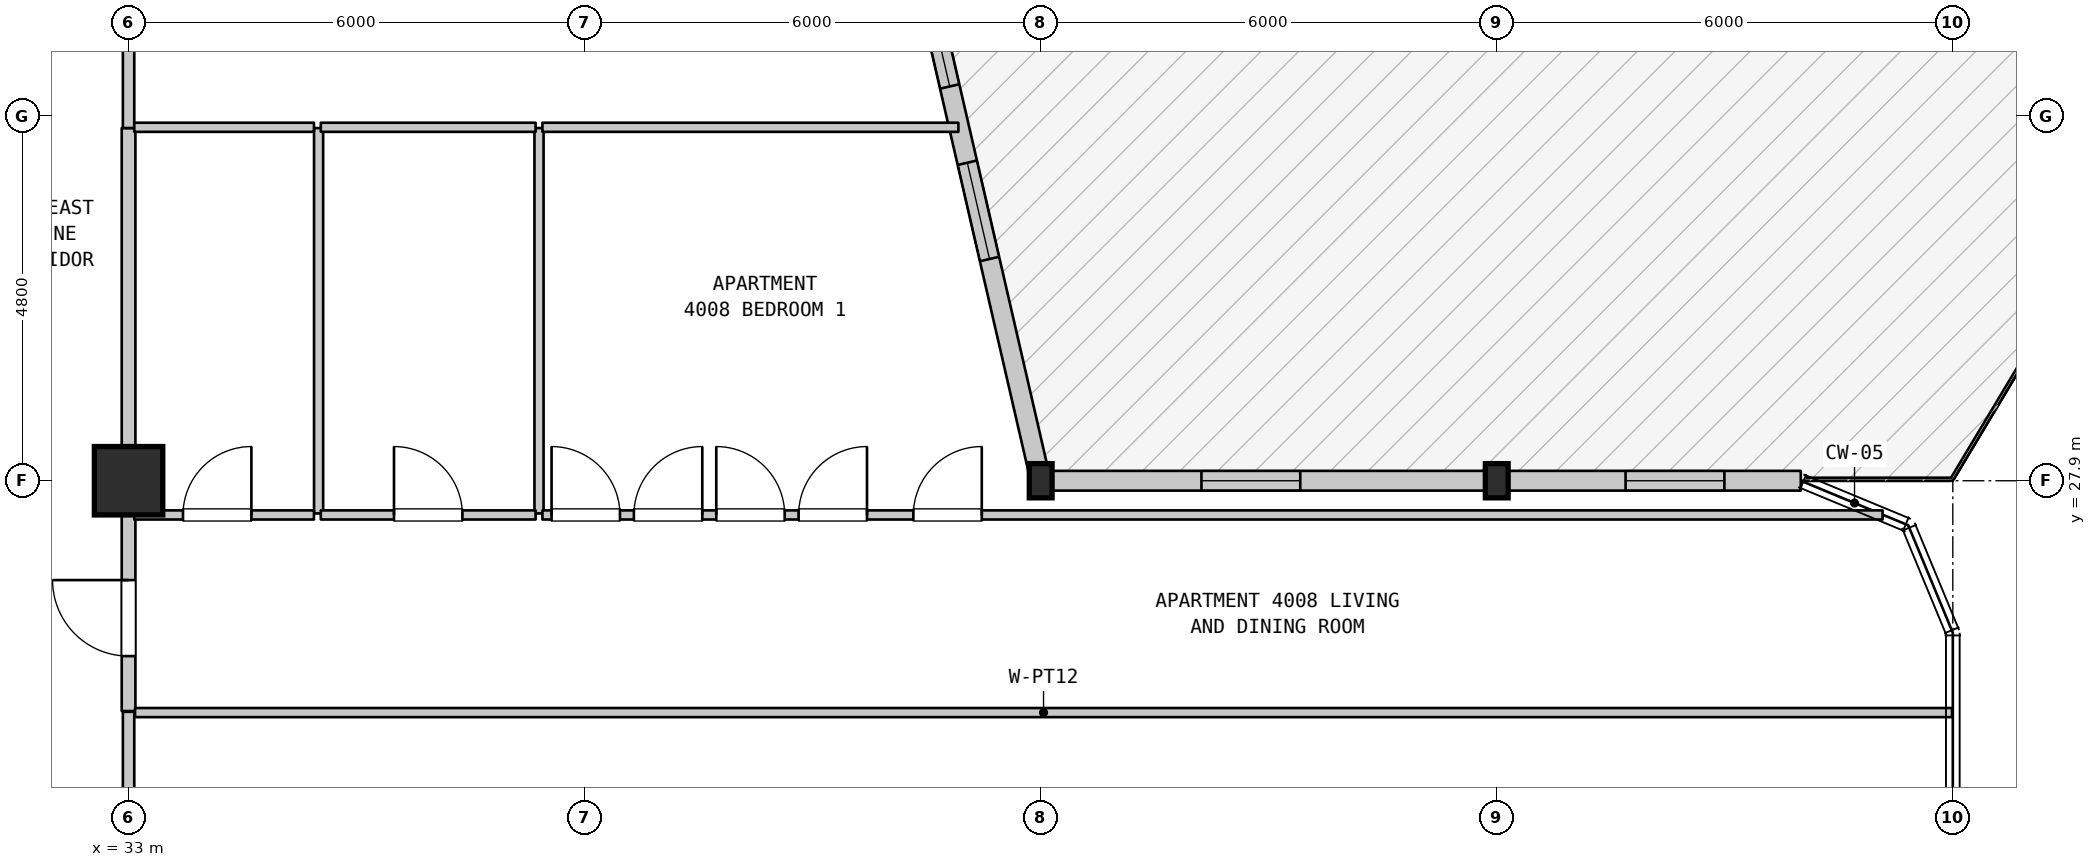
"""IFC4 building model, lengths in metres.
Left out: names, types, materials, properties, quantities, classifications, styles, units other than length and angle.
Written with IfcOpenShell. Run it as: python <this file> out.ifc"""

import sys

from ifc_helpers import new_model, si_unit, direction, frame, frame_2d, origin, origin_2d, place, context, subcontext, project, spatial, rectangle, i_section, extrude, element, fill, save


model = new_model("IFC4")
c1 = context("Model", 3, precision=1e-05, world=origin(), true_north=direction((0.0, 1.0)))
c2 = subcontext(c1, "Body", "Model", "MODEL_VIEW")
j1 = project(units=[si_unit("LENGTHUNIT", "METRE"), si_unit("PLANEANGLEUNIT", "RADIAN")], contexts=[c1])
p1 = place(None, origin())
s1 = spatial("IfcSite", under=j1, at=p1, CompositionType="ELEMENT")
p2 = place(p1, origin())
s2 = spatial("IfcBuilding", under=s1, at=p2, CompositionType="ELEMENT")
p3 = place(p2, frame((0.0, 0.0, 164.6)))
s3 = spatial("IfcBuildingStorey", under=s2, at=p3, CompositionType="ELEMENT", Elevation=164.6)
p4 = place(p3, frame((33.0, 27.9, 0.0), z_axis=(0.0, 0.0, 1.0), x_axis=(1.0, 0.0, 0.0)))
e1 = element("IfcColumn", 1, at=p4, inside=s3, PredefinedType="COLUMN", context=c2, shape_type="SweptSolid", body=[
    extrude(rectangle(XDim=0.9, YDim=0.9, at=origin_2d()), origin(), (0.0, 0.0, 1.0), 4.5),
])
for number, where, z_axis, x_axis in (
    (2, (45.0, 27.9, 0.0), (0.0, 0.0, 1.0), (1.0, 0.0, 0.0)),
    (3, (51.0, 27.9, 0.0), (0.0, 0.0, 1.0), (1.0, 0.0, 0.0)),
):
    element("IfcColumn", number, at=place(p3, frame(where, z_axis=z_axis, x_axis=x_axis)), inside=s3, PredefinedType="COLUMN", context=c2, shape_type="SweptSolid", body=[
        extrude(i_section(OverallWidth=0.3, OverallDepth=0.45, WebThickness=0.014, FlangeThickness=0.026, FilletRadius=0.027, at=origin_2d()), origin(), (0.0, 0.0, 1.0), 4.5),
    ])
p5 = place(p3, frame((39.358, 52.35, 0.0), z_axis=(0.0, 0.0, 1.0), x_axis=(0.224849558511, -0.974393491377, 0.0)))
e4 = element("IfcWall", 4, at=p5, inside=s3, PredefinedType="STANDARD", context=c2, shape_type="SweptSolid", body=[
    extrude(rectangle(XDim=25.093, YDim=0.26, at=frame_2d((12.546, 0.0))), origin(), (0.0, 0.0, 1.0), 4.19),
])
p6 = place(p5, frame((16.689, 0.0, 0.0)))
e5 = element("IfcOpeningElement", 5, at=p6, cuts=e4, PredefinedType="OPENING", context=c2, shape_type="SweptSolid", body=[
    extrude(rectangle(XDim=1.4, YDim=2.2, at=frame_2d((0.7, 1.1))), frame((0.0, 0.14, 0.0), z_axis=(0.0, -1.0, 0.0), x_axis=(1.0, 0.0, 0.0)), (0.0, 0.0, 1.0), 0.28),
])
p7 = place(p5, frame((0.915, 0.0, 0.9)))
e6 = element("IfcOpeningElement", 6, at=p7, cuts=e4, PredefinedType="OPENING", context=c2, shape_type="SweptSolid", body=[
    extrude(rectangle(XDim=1.4, YDim=1.85, at=frame_2d((0.7, 0.925))), frame((0.0, 0.14, 0.0), z_axis=(0.0, -1.0, 0.0), x_axis=(1.0, 0.0, 0.0)), (0.0, 0.0, 1.0), 0.28),
])
p8 = place(p5, frame((3.344, 0.0, 0.9)))
e7 = element("IfcOpeningElement", 7, at=p8, cuts=e4, PredefinedType="OPENING", context=c2, shape_type="SweptSolid", body=[
    extrude(rectangle(XDim=1.3, YDim=1.9, at=frame_2d((0.65, 0.95))), frame((0.0, 0.14, 0.0), z_axis=(0.0, -1.0, 0.0), x_axis=(1.0, 0.0, 0.0)), (0.0, 0.0, 1.0), 0.28),
])
p9 = place(p5, frame((5.323, 0.0, 0.9)))
e8 = element("IfcOpeningElement", 8, at=p9, cuts=e4, PredefinedType="OPENING", context=c2, shape_type="SweptSolid", body=[
    extrude(rectangle(XDim=1.4, YDim=1.85, at=frame_2d((0.7, 0.925))), frame((0.0, 0.14, 0.0), z_axis=(0.0, -1.0, 0.0), x_axis=(1.0, 0.0, 0.0)), (0.0, 0.0, 1.0), 0.28),
])
p10 = place(p5, frame((8.202, 0.0, 0.9)))
e9 = element("IfcOpeningElement", 9, at=p10, cuts=e4, PredefinedType="OPENING", context=c2, shape_type="SweptSolid", body=[
    extrude(rectangle(XDim=1.3, YDim=1.9, at=frame_2d((0.65, 0.95))), frame((0.0, 0.14, 0.0), z_axis=(0.0, -1.0, 0.0), x_axis=(1.0, 0.0, 0.0)), (0.0, 0.0, 1.0), 0.28),
])
p11 = place(p5, frame((10.632, 0.0, 0.9)))
e10 = element("IfcOpeningElement", 10, at=p11, cuts=e4, PredefinedType="OPENING", context=c2, shape_type="SweptSolid", body=[
    extrude(rectangle(XDim=1.4, YDim=1.85, at=frame_2d((0.7, 0.925))), frame((0.0, 0.14, 0.0), z_axis=(0.0, -1.0, 0.0), x_axis=(1.0, 0.0, 0.0)), (0.0, 0.0, 1.0), 0.28),
])
p12 = place(p5, frame((13.061, 0.0, 0.9)))
e11 = element("IfcOpeningElement", 11, at=p12, cuts=e4, PredefinedType="OPENING", context=c2, shape_type="SweptSolid", body=[
    extrude(rectangle(XDim=1.3, YDim=1.9, at=frame_2d((0.65, 0.95))), frame((0.0, 0.14, 0.0), z_axis=(0.0, -1.0, 0.0), x_axis=(1.0, 0.0, 0.0)), (0.0, 0.0, 1.0), 0.28),
])
p13 = place(p5, frame((18.369, 0.0, 0.9)))
e12 = element("IfcOpeningElement", 12, at=p13, cuts=e4, PredefinedType="OPENING", context=c2, shape_type="SweptSolid", body=[
    extrude(rectangle(XDim=1.4, YDim=1.85, at=frame_2d((0.7, 0.925))), frame((0.0, 0.14, 0.0), z_axis=(0.0, -1.0, 0.0), x_axis=(1.0, 0.0, 0.0)), (0.0, 0.0, 1.0), 0.28),
])
p14 = place(p5, frame((20.799, 0.0, 0.9)))
e13 = element("IfcOpeningElement", 13, at=p14, cuts=e4, PredefinedType="OPENING", context=c2, shape_type="SweptSolid", body=[
    extrude(rectangle(XDim=1.3, YDim=1.9, at=frame_2d((0.65, 0.95))), frame((0.0, 0.14, 0.0), z_axis=(0.0, -1.0, 0.0), x_axis=(1.0, 0.0, 0.0)), (0.0, 0.0, 1.0), 0.28),
])
p15 = place(p3, frame((45.0, 27.9, 0.0), z_axis=(0.0, 0.0, 1.0), x_axis=(1.0, 0.0, 0.0)))
e14 = element("IfcWall", 14, at=p15, inside=s3, PredefinedType="STANDARD", context=c2, shape_type="SweptSolid", body=[
    extrude(rectangle(XDim=6.0, YDim=0.26, at=frame_2d((3.0, 0.0))), origin(), (0.0, 0.0, 1.0), 3.89),
])
p16 = place(p15, frame((2.115, 0.0, 0.85)))
e15 = element("IfcOpeningElement", 15, at=p16, cuts=e14, PredefinedType="OPENING", context=c2, shape_type="SweptSolid", body=[
    extrude(rectangle(XDim=1.3, YDim=1.9, at=frame_2d((0.65, 0.95))), frame((0.0, 0.14, 0.0), z_axis=(0.0, -1.0, 0.0), x_axis=(1.0, 0.0, 0.0)), (0.0, 0.0, 1.0), 0.28),
])
p17 = place(p3, frame((33.0, 19.51, 0.0), z_axis=(0.0, 0.0, 1.0), x_axis=(0.0, 1.0, 0.0)))
e16 = element("IfcWall", 16, at=p17, inside=s3, PredefinedType="STANDARD", context=c2, shape_type="SweptSolid", body=[
    extrude(rectangle(XDim=5.35, YDim=0.15, at=frame_2d((2.675, 0.0))), origin(), (0.0, 0.0, 1.0), 3.79),
])
p18 = place(p17, frame((1.534, 0.0, 0.0)))
e17 = element("IfcOpeningElement", 17, at=p18, cuts=e16, PredefinedType="OPENING", context=c2, shape_type="SweptSolid", body=[
    extrude(rectangle(XDim=1.0, YDim=2.15, at=frame_2d((0.5, 1.075))), frame((0.0, 0.085, 0.0), z_axis=(0.0, -1.0, 0.0), x_axis=(1.0, 0.0, 0.0)), (0.0, 0.0, 1.0), 0.17),
])
p19 = place(p3, frame((33.0, 24.87, 0.0), z_axis=(0.0, 0.0, 1.0), x_axis=(0.0, 1.0, 0.0)))
e18 = element("IfcWall", 18, at=p19, inside=s3, PredefinedType="STANDARD", context=c2, shape_type="SweptSolid", body=[
    extrude(rectangle(XDim=2.6, YDim=0.18, at=frame_2d((1.3, 0.0))), origin(), (0.0, 0.0, 1.0), 3.79),
])
p20 = place(p19, frame((0.723, 0.0, 0.0)))
e19 = element("IfcOpeningElement", 19, at=p20, cuts=e18, PredefinedType="OPENING", context=c2, shape_type="SweptSolid", body=[
    extrude(rectangle(XDim=1.0, YDim=2.15, at=frame_2d((0.5, 1.075))), frame((0.0, 0.1, 0.0), z_axis=(0.0, -1.0, 0.0), x_axis=(1.0, 0.0, 0.0)), (0.0, 0.0, 1.0), 0.2),
])
p21 = place(p3, frame((33.0, 27.47, 0.0), z_axis=(0.0, 0.0, 1.0), x_axis=(0.0, 1.0, 0.0)))
e20 = element("IfcWall", 20, at=p21, inside=s3, PredefinedType="STANDARD", context=c2, shape_type="SweptSolid", body=[
    extrude(rectangle(XDim=5.07, YDim=0.18, at=frame_2d((2.535, 0.0))), origin(), (0.0, 0.0, 1.0), 3.69),
])
p22 = place(p3, frame((33.0, 32.54, 0.0), z_axis=(0.0, 0.0, 1.0), x_axis=(0.0, 1.0, 0.0)))
e21 = element("IfcWall", 21, at=p22, inside=s3, PredefinedType="STANDARD", context=c2, shape_type="SweptSolid", body=[
    extrude(rectangle(XDim=5.36, YDim=0.15, at=frame_2d((2.68, 0.0))), origin(), (0.0, 0.0, 1.0), 3.69),
])
p23 = place(p22, frame((2.109, 0.0, 0.0)))
e22 = element("IfcOpeningElement", 22, at=p23, cuts=e21, PredefinedType="OPENING", context=c2, shape_type="SweptSolid", body=[
    extrude(rectangle(XDim=1.0, YDim=2.15, at=frame_2d((0.5, 1.075))), frame((0.0, 0.085, 0.0), z_axis=(0.0, -1.0, 0.0), x_axis=(1.0, 0.0, 0.0)), (0.0, 0.0, 1.0), 0.17),
])
for number, where, z_axis, x_axis in (
    (23, (35.5, 27.47, 0.0), (0.0, 0.0, 1.0), (0.0, 1.0, 0.0)),
    (24, (38.4, 27.47, 0.0), (0.0, 0.0, 1.0), (0.0, 1.0, 0.0)),
):
    element("IfcWall", number, at=place(p3, frame(where, z_axis=z_axis, x_axis=x_axis)), inside=s3, PredefinedType="PARTITIONING", context=c2, shape_type="SweptSolid", body=[
        extrude(rectangle(XDim=5.07, YDim=0.12, at=frame_2d((2.535, 0.0))), origin(), (0.0, 0.0, 1.0), 4.19),
    ])
p24 = place(p3, frame((33.085, 24.85, 0.0), z_axis=(0.0, 0.0, 1.0), x_axis=(1.0, 0.0, 0.0)))
e25 = element("IfcWall", 25, at=p24, inside=s3, PredefinedType="PARTITIONING", context=c2, shape_type="SweptSolid", body=[
    extrude(rectangle(XDim=23.905, YDim=0.12, at=frame_2d((11.953, 0.0))), origin(), (0.0, 0.0, 1.0), 4.19),
])
p25 = place(p3, frame((33.075, 27.45, 0.0), z_axis=(0.0, 0.0, 1.0), x_axis=(1.0, 0.0, 0.0)))
e26 = element("IfcWall", 26, at=p25, inside=s3, PredefinedType="PARTITIONING", context=c2, shape_type="SweptSolid", body=[
    extrude(rectangle(XDim=2.364, YDim=0.12, at=frame_2d((1.182, 0.0))), origin(), (0.0, 0.0, 1.0), 4.19),
])
p26 = place(p25, frame((0.641, 0.0, 0.0)))
e27 = element("IfcOpeningElement", 27, at=p26, cuts=e26, PredefinedType="OPENING", context=c2, shape_type="SweptSolid", body=[
    extrude(rectangle(XDim=0.9, YDim=2.15, at=frame_2d((0.45, 1.075))), frame((0.0, 0.07, 0.0), z_axis=(0.0, -1.0, 0.0), x_axis=(1.0, 0.0, 0.0)), (0.0, 0.0, 1.0), 0.14),
])
p27 = place(p3, frame((35.529, 27.45, 0.0), z_axis=(0.0, 0.0, 1.0), x_axis=(1.0, 0.0, 0.0)))
e28 = element("IfcWall", 28, at=p27, inside=s3, PredefinedType="PARTITIONING", context=c2, shape_type="SweptSolid", body=[
    extrude(rectangle(XDim=2.826, YDim=0.12, at=frame_2d((1.413, 0.0))), origin(), (0.0, 0.0, 1.0), 4.19),
])
p28 = place(p27, frame((0.963, 0.0, 0.0)))
e29 = element("IfcOpeningElement", 29, at=p28, cuts=e28, PredefinedType="OPENING", context=c2, shape_type="SweptSolid", body=[
    extrude(rectangle(XDim=0.9, YDim=2.1, at=frame_2d((0.45, 1.05))), frame((0.0, 0.07, 0.0), z_axis=(0.0, -1.0, 0.0), x_axis=(1.0, 0.0, 0.0)), (0.0, 0.0, 1.0), 0.14),
])
p29 = place(p3, frame((38.445, 27.45, 0.0), z_axis=(0.0, 0.0, 1.0), x_axis=(1.0, 0.0, 0.0)))
e30 = element("IfcWall", 30, at=p29, inside=s3, PredefinedType="PARTITIONING", context=c2, shape_type="SweptSolid", body=[
    extrude(rectangle(XDim=17.631, YDim=0.12, at=frame_2d((8.815, 0.0))), origin(), (0.0, 0.0, 1.0), 4.19),
])
p30 = place(p29, frame((4.88, 0.0, 0.0)))
e31 = element("IfcOpeningElement", 31, at=p30, cuts=e30, PredefinedType="OPENING", context=c2, shape_type="SweptSolid", body=[
    extrude(rectangle(XDim=0.9, YDim=2.15, at=frame_2d((0.45, 1.075))), frame((0.0, 0.07, 0.0), z_axis=(0.0, -1.0, 0.0), x_axis=(1.0, 0.0, 0.0)), (0.0, 0.0, 1.0), 0.14),
])
p31 = place(p29, frame((0.12, 0.0, 0.0)))
e32 = element("IfcOpeningElement", 32, at=p31, cuts=e30, PredefinedType="OPENING", context=c2, shape_type="SweptSolid", body=[
    extrude(rectangle(XDim=0.9, YDim=2.15, at=frame_2d((0.45, 1.075))), frame((0.0, 0.07, 0.0), z_axis=(0.0, -1.0, 0.0), x_axis=(1.0, 0.0, 0.0)), (0.0, 0.0, 1.0), 0.14),
])
p32 = place(p29, frame((1.203, 0.0, 0.0)))
e33 = element("IfcOpeningElement", 33, at=p32, cuts=e30, PredefinedType="OPENING", context=c2, shape_type="SweptSolid", body=[
    extrude(rectangle(XDim=0.9, YDim=2.15, at=frame_2d((0.45, 1.075))), frame((0.0, 0.07, 0.0), z_axis=(0.0, -1.0, 0.0), x_axis=(1.0, 0.0, 0.0)), (0.0, 0.0, 1.0), 0.14),
])
p33 = place(p29, frame((2.287, 0.0, 0.0)))
e34 = element("IfcOpeningElement", 34, at=p33, cuts=e30, PredefinedType="OPENING", context=c2, shape_type="SweptSolid", body=[
    extrude(rectangle(XDim=0.9, YDim=2.15, at=frame_2d((0.45, 1.075))), frame((0.0, 0.07, 0.0), z_axis=(0.0, -1.0, 0.0), x_axis=(1.0, 0.0, 0.0)), (0.0, 0.0, 1.0), 0.14),
])
p34 = place(p29, frame((3.37, 0.0, 0.0)))
e35 = element("IfcOpeningElement", 35, at=p34, cuts=e30, PredefinedType="OPENING", context=c2, shape_type="SweptSolid", body=[
    extrude(rectangle(XDim=0.9, YDim=2.15, at=frame_2d((0.45, 1.075))), frame((0.0, 0.07, 0.0), z_axis=(0.0, -1.0, 0.0), x_axis=(1.0, 0.0, 0.0)), (0.0, 0.0, 1.0), 0.14),
])
p35 = place(p3, frame((33.075, 32.55, 0.0), z_axis=(0.0, 0.0, 1.0), x_axis=(1.0, 0.0, 0.0)))
e36 = element("IfcWall", 36, at=p35, inside=s3, PredefinedType="PARTITIONING", context=c2, shape_type="SweptSolid", body=[
    extrude(rectangle(XDim=2.364, YDim=0.12, at=frame_2d((1.182, 0.0))), origin(), (0.0, 0.0, 1.0), 4.19),
])
p36 = place(p3, frame((35.529, 32.55, 0.0), z_axis=(0.0, 0.0, 1.0), x_axis=(1.0, 0.0, 0.0)))
e37 = element("IfcWall", 37, at=p36, inside=s3, PredefinedType="PARTITIONING", context=c2, shape_type="SweptSolid", body=[
    extrude(rectangle(XDim=2.826, YDim=0.12, at=frame_2d((1.413, 0.0))), origin(), (0.0, 0.0, 1.0), 4.19),
])
p37 = place(p3, frame((38.445, 32.55, 0.0), z_axis=(0.0, 0.0, 1.0), x_axis=(1.0, 0.0, 0.0)))
e38 = element("IfcWall", 38, at=p37, inside=s3, PredefinedType="PARTITIONING", context=c2, shape_type="SweptSolid", body=[
    extrude(rectangle(XDim=5.472, YDim=0.12, at=frame_2d((2.736, 0.0))), origin(), (0.0, 0.0, 1.0), 4.19),
])
p38 = place(p3, frame((51.0, 27.9, 0.0), z_axis=(0.0, 0.0, 1.0), x_axis=(1.0, 0.0, 0.0)))
e39 = element("IfcWall", 39, at=p38, inside=s3, PredefinedType="STANDARD", context=c2, shape_type="SweptSolid", body=[
    extrude(rectangle(XDim=4.0, YDim=0.26, at=frame_2d((2.0, 0.0))), origin(), (0.0, 0.0, 1.0), 4.19),
])
p39 = place(p38, frame((1.695, 0.0, 0.85)))
e40 = element("IfcOpeningElement", 40, at=p39, cuts=e39, PredefinedType="OPENING", context=c2, shape_type="SweptSolid", body=[
    extrude(rectangle(XDim=1.3, YDim=1.9, at=frame_2d((0.65, 0.95))), frame((0.0, 0.14, 0.0), z_axis=(0.0, -1.0, 0.0), x_axis=(1.0, 0.0, 0.0)), (0.0, 0.0, 1.0), 0.28),
])
p40 = place(p13, origin())
e41 = element("IfcWindow", 41, at=p40, inside=s3, PartitioningType="SINGLE_PANEL", PredefinedType="WINDOW", context=c2, shape_type="SweptSolid", body=[
    extrude(rectangle(XDim=1.4, YDim=1.85, at=frame_2d((0.7, 0.925))), frame((0.0, 0.03, 0.0), z_axis=(0.0, -1.0, 0.0), x_axis=(1.0, 0.0, 0.0)), (0.0, 0.0, 1.0), 0.06),
])
fill(e12, e41)
p41 = place(p14, origin())
e42 = element("IfcWindow", 42, at=p41, inside=s3, PartitioningType="SINGLE_PANEL", PredefinedType="WINDOW", context=c2, shape_type="SweptSolid", body=[
    extrude(rectangle(XDim=1.3, YDim=1.9, at=frame_2d((0.65, 0.95))), frame((0.0, 0.03, 0.0), z_axis=(0.0, -1.0, 0.0), x_axis=(1.0, 0.0, 0.0)), (0.0, 0.0, 1.0), 0.06),
])
fill(e13, e42)
p42 = place(p16, origin())
e43 = element("IfcWindow", 43, at=p42, inside=s3, PartitioningType="SINGLE_PANEL", PredefinedType="WINDOW", context=c2, shape_type="SweptSolid", body=[
    extrude(rectangle(XDim=1.3, YDim=1.9, at=frame_2d((0.65, 0.95))), frame((0.0, 0.03, 0.0), z_axis=(0.0, -1.0, 0.0), x_axis=(1.0, 0.0, 0.0)), (0.0, 0.0, 1.0), 0.06),
])
fill(e15, e43)
p43 = place(p39, origin())
e44 = element("IfcWindow", 44, at=p43, inside=s3, PartitioningType="SINGLE_PANEL", PredefinedType="WINDOW", context=c2, shape_type="SweptSolid", body=[
    extrude(rectangle(XDim=1.3, YDim=1.9, at=frame_2d((0.65, 0.95))), frame((0.0, 0.03, 0.0), z_axis=(0.0, -1.0, 0.0), x_axis=(1.0, 0.0, 0.0)), (0.0, 0.0, 1.0), 0.06),
])
fill(e40, e44)
p44 = place(p20, origin())
e45 = element("IfcDoor", 45, at=p44, inside=s3, OperationType="SINGLE_SWING_RIGHT", PredefinedType="DOOR", context=c2, shape_type="SweptSolid", body=[
    extrude(rectangle(XDim=1.0, YDim=2.15, at=frame_2d((0.5, 1.075))), frame((0.0, 0.025, 0.0), z_axis=(0.0, -1.0, 0.0), x_axis=(1.0, 0.0, 0.0)), (0.0, 0.0, 1.0), 0.05),
])
fill(e19, e45)
p45 = place(p26, origin())
e46 = element("IfcDoor", 46, at=p45, inside=s3, OperationType="SINGLE_SWING_RIGHT", PredefinedType="DOOR", context=c2, shape_type="SweptSolid", body=[
    extrude(rectangle(XDim=0.9, YDim=2.15, at=frame_2d((0.45, 1.075))), frame((0.0, 0.025, 0.0), z_axis=(0.0, -1.0, 0.0), x_axis=(1.0, 0.0, 0.0)), (0.0, 0.0, 1.0), 0.05),
])
fill(e27, e46)
p46 = place(p28, origin())
e47 = element("IfcDoor", 47, at=p46, inside=s3, OperationType="SINGLE_SWING_LEFT", PredefinedType="DOOR", context=c2, shape_type="SweptSolid", body=[
    extrude(rectangle(XDim=0.9, YDim=2.1, at=frame_2d((0.45, 1.05))), frame((0.0, 0.025, 0.0), z_axis=(0.0, -1.0, 0.0), x_axis=(1.0, 0.0, 0.0)), (0.0, 0.0, 1.0), 0.05),
])
fill(e29, e47)
p47 = place(p30, origin())
e48 = element("IfcDoor", 48, at=p47, inside=s3, OperationType="SINGLE_SWING_RIGHT", PredefinedType="DOOR", context=c2, shape_type="SweptSolid", body=[
    extrude(rectangle(XDim=0.9, YDim=2.15, at=frame_2d((0.45, 1.075))), frame((0.0, 0.025, 0.0), z_axis=(0.0, -1.0, 0.0), x_axis=(1.0, 0.0, 0.0)), (0.0, 0.0, 1.0), 0.05),
])
fill(e31, e48)
p48 = place(p31, origin())
e49 = element("IfcDoor", 49, at=p48, inside=s3, OperationType="SINGLE_SWING_LEFT", PredefinedType="DOOR", context=c2, shape_type="SweptSolid", body=[
    extrude(rectangle(XDim=0.9, YDim=2.15, at=frame_2d((0.45, 1.075))), frame((0.0, 0.025, 0.0), z_axis=(0.0, -1.0, 0.0), x_axis=(1.0, 0.0, 0.0)), (0.0, 0.0, 1.0), 0.05),
])
fill(e32, e49)
p49 = place(p32, origin())
e50 = element("IfcDoor", 50, at=p49, inside=s3, OperationType="SINGLE_SWING_RIGHT", PredefinedType="DOOR", context=c2, shape_type="SweptSolid", body=[
    extrude(rectangle(XDim=0.9, YDim=2.15, at=frame_2d((0.45, 1.075))), frame((0.0, 0.025, 0.0), z_axis=(0.0, -1.0, 0.0), x_axis=(1.0, 0.0, 0.0)), (0.0, 0.0, 1.0), 0.05),
])
fill(e33, e50)
p50 = place(p33, origin())
e51 = element("IfcDoor", 51, at=p50, inside=s3, OperationType="SINGLE_SWING_LEFT", PredefinedType="DOOR", context=c2, shape_type="SweptSolid", body=[
    extrude(rectangle(XDim=0.9, YDim=2.15, at=frame_2d((0.45, 1.075))), frame((0.0, 0.025, 0.0), z_axis=(0.0, -1.0, 0.0), x_axis=(1.0, 0.0, 0.0)), (0.0, 0.0, 1.0), 0.05),
])
fill(e34, e51)
p51 = place(p34, origin())
e52 = element("IfcDoor", 52, at=p51, inside=s3, OperationType="SINGLE_SWING_RIGHT", PredefinedType="DOOR", context=c2, shape_type="SweptSolid", body=[
    extrude(rectangle(XDim=0.9, YDim=2.15, at=frame_2d((0.45, 1.075))), frame((0.0, 0.025, 0.0), z_axis=(0.0, -1.0, 0.0), x_axis=(1.0, 0.0, 0.0)), (0.0, 0.0, 1.0), 0.05),
])
fill(e35, e52)
save(model, sys.argv[1])
